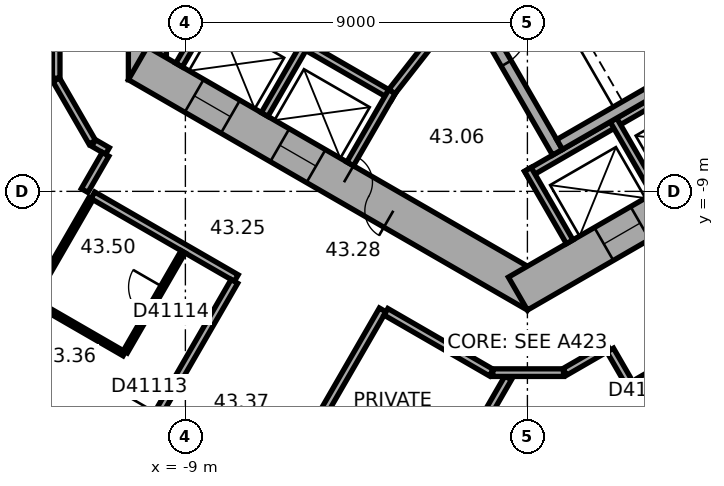
"""IFC4 building model, lengths in metres.
Left out: names, types, materials, properties, quantities, classifications, styles, units other than length and angle.
Written with IfcOpenShell. Run it as: python <this file> out.ifc"""

import sys

from ifc_helpers import new_model, si_unit, direction, frame, frame_2d, origin, place, context, subcontext, project, spatial, rectangle, extrude, element, fill, save


model = new_model("IFC4")
c1 = context("Model", 3, precision=1e-05, world=origin(), true_north=direction((0.0, 1.0)))
c2 = subcontext(c1, "Body", "Model", "MODEL_VIEW")
j1 = project(units=[si_unit("LENGTHUNIT", "METRE"), si_unit("PLANEANGLEUNIT", "RADIAN")], contexts=[c1])
p1 = place(None, origin())
s1 = spatial("IfcSite", under=j1, at=p1, CompositionType="ELEMENT")
p2 = place(p1, origin())
s2 = spatial("IfcBuilding", under=s1, at=p2, CompositionType="ELEMENT")
p3 = place(p2, frame((0.0, 0.0, 176.2)))
s3 = spatial("IfcBuildingStorey", under=s2, at=p3, CompositionType="ELEMENT", Elevation=176.2)
p4 = place(p3, frame((-10.0, 6.062, 0.0), z_axis=(0.0, 0.0, 1.0), x_axis=(0.0, -1.0, 0.0)))
e1 = element("IfcWall", 1, at=p4, inside=s3, PredefinedType="SHEAR", context=c2, shape_type="SweptSolid", body=[
    extrude(rectangle(XDim=12.125, YDim=1.0, at=frame_2d((6.062, 0.0))), origin(), (0.0, 0.0, 1.0), 3.7),
])
p5 = place(p4, frame((5.212, 0.0, 0.0)))
e2 = element("IfcOpeningElement", 2, at=p5, cuts=e1, PredefinedType="OPENING", context=c2, shape_type="SweptSolid", body=[
    extrude(rectangle(XDim=1.1, YDim=2.1, at=frame_2d((0.55, 1.05))), frame((0.0, 0.51, 0.0), z_axis=(0.0, -1.0, 0.0), x_axis=(1.0, 0.0, 0.0)), (0.0, 0.0, 1.0), 1.02),
])
p6 = place(p4, frame((7.812, 0.0, 0.0)))
e3 = element("IfcOpeningElement", 3, at=p6, cuts=e1, PredefinedType="OPENING", context=c2, shape_type="SweptSolid", body=[
    extrude(rectangle(XDim=1.1, YDim=2.1, at=frame_2d((0.55, 1.05))), frame((0.0, 0.51, 0.0), z_axis=(0.0, -1.0, 0.0), x_axis=(1.0, 0.0, 0.0)), (0.0, 0.0, 1.0), 1.02),
])
p7 = place(p3, frame((-10.25, -5.629, 0.0), z_axis=(0.0, 0.0, 1.0), x_axis=(0.866022616891, -0.50000482701, 0.0)))
e4 = element("IfcWall", 4, at=p7, inside=s3, PredefinedType="SHEAR", context=c2, shape_type="SweptSolid", body=[
    extrude(rectangle(XDim=12.125, YDim=1.0, at=frame_2d((6.062, 0.0))), origin(), (0.0, 0.0, 1.0), 3.7),
])
p8 = place(p7, frame((6.262, 0.0, 0.0)))
e5 = element("IfcOpeningElement", 5, at=p8, cuts=e4, PredefinedType="OPENING", context=c2, shape_type="SweptSolid", body=[
    extrude(rectangle(XDim=1.5, YDim=2.1, at=frame_2d((0.75, 1.05))), frame((0.0, 0.51, 0.0), z_axis=(0.0, -1.0, 0.0), x_axis=(1.0, 0.0, 0.0)), (0.0, 0.0, 1.0), 1.02),
])
p9 = place(p7, frame((1.712, 0.0, 0.0)))
e6 = element("IfcOpeningElement", 6, at=p9, cuts=e4, PredefinedType="OPENING", context=c2, shape_type="SweptSolid", body=[
    extrude(rectangle(XDim=1.1, YDim=2.1, at=frame_2d((0.55, 1.05))), frame((0.0, 0.51, 0.0), z_axis=(0.0, -1.0, 0.0), x_axis=(1.0, 0.0, 0.0)), (0.0, 0.0, 1.0), 1.02),
])
p10 = place(p7, frame((4.312, 0.0, 0.0)))
e7 = element("IfcOpeningElement", 7, at=p10, cuts=e4, PredefinedType="OPENING", context=c2, shape_type="SweptSolid", body=[
    extrude(rectangle(XDim=1.1, YDim=2.1, at=frame_2d((0.55, 1.05))), frame((0.0, 0.51, 0.0), z_axis=(0.0, -1.0, 0.0), x_axis=(1.0, 0.0, 0.0)), (0.0, 0.0, 1.0), 1.02),
])
p11 = place(p3, frame((-0.25, -11.691, 0.0), z_axis=(0.0, 0.0, 1.0), x_axis=(0.866022616891, 0.50000482701, 0.0)))
e8 = element("IfcWall", 8, at=p11, inside=s3, PredefinedType="SHEAR", context=c2, shape_type="SweptSolid", body=[
    extrude(rectangle(XDim=12.125, YDim=1.0, at=frame_2d((6.062, 0.0))), origin(), (0.0, 0.0, 1.0), 3.7),
])
p12 = place(p11, frame((2.612, 0.0, 0.0)))
e9 = element("IfcOpeningElement", 9, at=p12, cuts=e8, PredefinedType="OPENING", context=c2, shape_type="SweptSolid", body=[
    extrude(rectangle(XDim=1.1, YDim=2.1, at=frame_2d((0.55, 1.05))), frame((0.0, 0.51, 0.0), z_axis=(0.0, -1.0, 0.0), x_axis=(1.0, 0.0, 0.0)), (0.0, 0.0, 1.0), 1.02),
])
p13 = place(p11, frame((5.212, 0.0, 0.0)))
e10 = element("IfcOpeningElement", 10, at=p13, cuts=e8, PredefinedType="OPENING", context=c2, shape_type="SweptSolid", body=[
    extrude(rectangle(XDim=1.1, YDim=2.1, at=frame_2d((0.55, 1.05))), frame((0.0, 0.51, 0.0), z_axis=(0.0, -1.0, 0.0), x_axis=(1.0, 0.0, 0.0)), (0.0, 0.0, 1.0), 1.02),
])
p14 = place(p11, frame((7.812, 0.0, 0.0)))
e11 = element("IfcOpeningElement", 11, at=p14, cuts=e8, PredefinedType="OPENING", context=c2, shape_type="SweptSolid", body=[
    extrude(rectangle(XDim=1.1, YDim=2.1, at=frame_2d((0.55, 1.05))), frame((0.0, 0.51, 0.0), z_axis=(0.0, -1.0, 0.0), x_axis=(1.0, 0.0, 0.0)), (0.0, 0.0, 1.0), 1.02),
])
p15 = place(p3, frame((-18.789, -14.267, 0.0), z_axis=(0.0, 0.0, 1.0), x_axis=(0.866023315909, -0.500003616288, 0.0)))
e12 = element("IfcWall", 12, at=p15, inside=s3, PredefinedType="STANDARD", context=c2, shape_type="SweptSolid", body=[
    extrude(rectangle(XDim=20.044, YDim=0.2, at=frame_2d((10.022, 0.0))), origin(), (0.0, 0.0, 1.0), 3.7),
])
p16 = place(p15, frame((1.314, 0.0, 0.9)))
e13 = element("IfcOpeningElement", 13, at=p16, cuts=e12, PredefinedType="OPENING", context=c2, shape_type="SweptSolid", body=[
    extrude(rectangle(XDim=2.4, YDim=2.0, at=frame_2d((1.2, 1.0))), frame((0.0, 0.11, 0.0), z_axis=(0.0, -1.0, 0.0), x_axis=(1.0, 0.0, 0.0)), (0.0, 0.0, 1.0), 0.22),
])
p17 = place(p15, frame((5.069, 0.0, 0.9)))
e14 = element("IfcOpeningElement", 14, at=p17, cuts=e12, PredefinedType="OPENING", context=c2, shape_type="SweptSolid", body=[
    extrude(rectangle(XDim=2.4, YDim=2.0, at=frame_2d((1.2, 1.0))), frame((0.0, 0.11, 0.0), z_axis=(0.0, -1.0, 0.0), x_axis=(1.0, 0.0, 0.0)), (0.0, 0.0, 1.0), 0.22),
])
p18 = place(p15, frame((8.823, 0.0, 0.9)))
e15 = element("IfcOpeningElement", 15, at=p18, cuts=e12, PredefinedType="OPENING", context=c2, shape_type="SweptSolid", body=[
    extrude(rectangle(XDim=2.4, YDim=2.0, at=frame_2d((1.2, 1.0))), frame((0.0, 0.11, 0.0), z_axis=(0.0, -1.0, 0.0), x_axis=(1.0, 0.0, 0.0)), (0.0, 0.0, 1.0), 0.22),
])
p19 = place(p15, frame((12.577, 0.0, 0.9)))
e16 = element("IfcOpeningElement", 16, at=p19, cuts=e12, PredefinedType="OPENING", context=c2, shape_type="SweptSolid", body=[
    extrude(rectangle(XDim=2.4, YDim=2.0, at=frame_2d((1.2, 1.0))), frame((0.0, 0.11, 0.0), z_axis=(0.0, -1.0, 0.0), x_axis=(1.0, 0.0, 0.0)), (0.0, 0.0, 1.0), 0.22),
])
p20 = place(p15, frame((16.331, 0.0, 0.9)))
e17 = element("IfcOpeningElement", 17, at=p20, cuts=e12, PredefinedType="OPENING", context=c2, shape_type="SweptSolid", body=[
    extrude(rectangle(XDim=2.4, YDim=2.0, at=frame_2d((1.2, 1.0))), frame((0.0, 0.11, 0.0), z_axis=(0.0, -1.0, 0.0), x_axis=(1.0, 0.0, 0.0)), (0.0, 0.0, 1.0), 0.22),
])
p21 = place(p3, frame((2.911, -24.156, 0.0), z_axis=(0.0, 0.0, 1.0), x_axis=(0.833882163564, 0.551942512668, 0.0)))
e18 = element("IfcWall", 18, at=p21, inside=s3, PredefinedType="STANDARD", context=c2, shape_type="SweptSolid", body=[
    extrude(rectangle(XDim=20.044, YDim=0.2, at=frame_2d((10.022, 0.0))), origin(), (0.0, 0.0, 1.0), 3.7),
])
p22 = place(p21, frame((1.313, 0.0, 0.9)))
e19 = element("IfcOpeningElement", 19, at=p22, cuts=e18, PredefinedType="OPENING", context=c2, shape_type="SweptSolid", body=[
    extrude(rectangle(XDim=2.4, YDim=2.0, at=frame_2d((1.2, 1.0))), frame((0.0, 0.11, 0.0), z_axis=(0.0, -1.0, 0.0), x_axis=(1.0, 0.0, 0.0)), (0.0, 0.0, 1.0), 0.22),
])
p23 = place(p21, frame((5.067, 0.0, 0.9)))
e20 = element("IfcOpeningElement", 20, at=p23, cuts=e18, PredefinedType="OPENING", context=c2, shape_type="SweptSolid", body=[
    extrude(rectangle(XDim=2.4, YDim=2.0, at=frame_2d((1.2, 1.0))), frame((0.0, 0.11, 0.0), z_axis=(0.0, -1.0, 0.0), x_axis=(1.0, 0.0, 0.0)), (0.0, 0.0, 1.0), 0.22),
])
p24 = place(p21, frame((8.821, 0.0, 0.9)))
e21 = element("IfcOpeningElement", 21, at=p24, cuts=e18, PredefinedType="OPENING", context=c2, shape_type="SweptSolid", body=[
    extrude(rectangle(XDim=2.4, YDim=2.0, at=frame_2d((1.2, 1.0))), frame((0.0, 0.11, 0.0), z_axis=(0.0, -1.0, 0.0), x_axis=(1.0, 0.0, 0.0)), (0.0, 0.0, 1.0), 0.22),
])
p25 = place(p21, frame((12.575, 0.0, 0.9)))
e22 = element("IfcOpeningElement", 22, at=p25, cuts=e18, PredefinedType="OPENING", context=c2, shape_type="SweptSolid", body=[
    extrude(rectangle(XDim=2.4, YDim=2.0, at=frame_2d((1.2, 1.0))), frame((0.0, 0.11, 0.0), z_axis=(0.0, -1.0, 0.0), x_axis=(1.0, 0.0, 0.0)), (0.0, 0.0, 1.0), 0.22),
])
p26 = place(p21, frame((16.329, 0.0, 0.9)))
e23 = element("IfcOpeningElement", 23, at=p26, cuts=e18, PredefinedType="OPENING", context=c2, shape_type="SweptSolid", body=[
    extrude(rectangle(XDim=2.4, YDim=2.0, at=frame_2d((1.2, 1.0))), frame((0.0, 0.11, 0.0), z_axis=(0.0, -1.0, 0.0), x_axis=(1.0, 0.0, 0.0)), (0.0, 0.0, 1.0), 0.22),
])
p27 = place(p3, frame((-8.203, -3.809, 0.0), z_axis=(0.0, 0.0, 1.0), x_axis=(0.866028230842, -0.499995103361, 0.0)))
e24 = element("IfcWall", 24, at=p27, inside=s3, PredefinedType="PARTITIONING", context=c2, shape_type="SweptSolid", body=[
    extrude(rectangle(XDim=5.4, YDim=0.2, at=frame_2d((2.7, 0.0))), origin(), (0.0, 0.0, 1.0), 3.42),
])
for number, where, z_axis, x_axis in (
    (25, (-8.067, -3.772, 0.0), (0.0, 0.0, 1.0), (-0.5, -0.866, 0.0)),
    (26, (-5.815, -5.072, 0.0), (0.0, 0.0, 1.0), (-0.5, -0.866, 0.0)),
):
    element("IfcWall", number, at=place(p3, frame(where, z_axis=z_axis, x_axis=x_axis)), inside=s3, PredefinedType="PARTITIONING", context=c2, shape_type="SweptSolid", body=[
        extrude(rectangle(XDim=2.2, YDim=0.2, at=frame_2d((1.1, 0.0))), origin(), (0.0, 0.0, 1.0), 3.42),
    ])
p28 = place(p3, frame((-3.563, -6.372, 0.0), z_axis=(0.0, 0.0, 1.0), x_axis=(-0.499994660107, -0.866028486751, 0.0)))
e27 = element("IfcWall", 27, at=p28, inside=s3, PredefinedType="PARTITIONING", context=c2, shape_type="SweptSolid", body=[
    extrude(rectangle(XDim=2.2, YDim=0.2, at=frame_2d((1.1, 0.0))), origin(), (0.0, 0.0, 1.0), 3.42),
])
p29 = place(p3, frame((-0.024, -8.559, 0.0), z_axis=(0.0, 0.0, 1.0), x_axis=(0.866026010844, 0.49999894854, 0.0)))
e28 = element("IfcWall", 28, at=p29, inside=s3, PredefinedType="PARTITIONING", context=c2, shape_type="SweptSolid", body=[
    extrude(rectangle(XDim=8.0, YDim=0.2, at=frame_2d((4.0, 0.0))), origin(), (0.0, 0.0, 1.0), 3.42),
])
for number, where, z_axis, x_axis in (
    (29, (0.013, -8.422, 0.0), (0.0, 0.0, 1.0), (0.5, -0.866, 0.0)),
    (30, (2.264, -7.122, 0.0), (0.0, 0.0, 1.0), (0.5, -0.866, 0.0)),
):
    element("IfcWall", number, at=place(p3, frame(where, z_axis=z_axis, x_axis=x_axis)), inside=s3, PredefinedType="PARTITIONING", context=c2, shape_type="SweptSolid", body=[
        extrude(rectangle(XDim=2.2, YDim=0.2, at=frame_2d((1.1, 0.0))), origin(), (0.0, 0.0, 1.0), 3.42),
    ])
p30 = place(p3, frame((-1.558, -3.902, 0.0), z_axis=(0.0, 0.0, 1.0), x_axis=(0.499977259774, -0.866038532462, 0.0)))
e31 = element("IfcWall", 31, at=p30, inside=s3, PredefinedType="SHEAR", context=c2, shape_type="SweptSolid", body=[
    extrude(rectangle(XDim=4.7, YDim=0.3, at=frame_2d((2.35, 0.0))), origin(), (0.0, 0.0, 1.0), 3.42),
])
p31 = place(p30, frame((0.8, 0.0, 0.0)))
e32 = element("IfcOpeningElement", 32, at=p31, cuts=e31, PredefinedType="OPENING", context=c2, shape_type="SweptSolid", body=[
    extrude(rectangle(XDim=1.2, YDim=2.1, at=frame_2d((0.6, 1.05))), frame((0.0, 0.16, 0.0), z_axis=(0.0, -1.0, 0.0), x_axis=(1.0, 0.0, 0.0)), (0.0, 0.0, 1.0), 0.32),
])
p32 = place(p3, frame((0.847, -7.767, 0.0), z_axis=(0.0, 0.0, 1.0), x_axis=(0.866027801685, 0.499995846692, 0.0)))
e33 = element("IfcWall", 33, at=p32, inside=s3, PredefinedType="SHEAR", context=c2, shape_type="SweptSolid", body=[
    extrude(rectangle(XDim=7.06, YDim=0.3, at=frame_2d((3.53, 0.0))), origin(), (0.0, 0.0, 1.0), 3.42),
])
p33 = place(p3, frame((-1.712, -4.008, 0.0), z_axis=(0.0, 0.0, 1.0), x_axis=(-0.616549420702, -0.787316208287, 0.0)))
e34 = element("IfcWall", 34, at=p33, inside=s3, PredefinedType="PARTITIONING", context=c2, shape_type="SweptSolid", body=[
    extrude(rectangle(XDim=3.002, YDim=0.2, at=frame_2d((1.501, 0.0))), origin(), (0.0, 0.0, 1.0), 3.42),
])
p34 = place(p3, frame((-20.421, -6.005, 0.0), z_axis=(0.0, 0.0, 1.0), x_axis=(0.998134865741, 0.061047438866, 0.0)))
e35 = element("IfcWall", 35, at=p34, inside=s3, PredefinedType="PARTITIONING", context=c2, shape_type="SweptSolid", body=[
    extrude(rectangle(XDim=7.927, YDim=0.2, at=frame_2d((3.963, 0.0))), origin(), (0.0, 0.0, 1.0), 2.87),
])
p35 = place(p3, frame((-13.035, -11.875, 0.0), z_axis=(0.0, 0.0, 1.0), x_axis=(0.500026960575, 0.86600983753, 0.0)))
e36 = element("IfcWall", 36, at=p35, inside=s3, PredefinedType="PARTITIONING", context=c2, shape_type="SweptSolid", body=[
    extrude(rectangle(XDim=3.1, YDim=0.12, at=frame_2d((1.55, 0.0))), origin(), (0.0, 0.0, 1.0), 3.42),
])
p36 = place(p3, frame((-12.4, -6.062, 0.0), z_axis=(0.0, 0.0, 1.0), x_axis=(0.500022797313, -0.86601224135, 0.0)))
e37 = element("IfcWall", 37, at=p36, inside=s3, PredefinedType="PARTITIONING", context=c2, shape_type="SweptSolid", body=[
    extrude(rectangle(XDim=1.9, YDim=0.2, at=frame_2d((0.95, 0.0))), origin(), (0.0, 0.0, 1.0), 3.42),
])
p37 = place(p3, frame((-12.4, -4.201, 0.0), z_axis=(0.0, 0.0, 1.0), x_axis=(0.0, -1.0, 0.0)))
e38 = element("IfcWall", 38, at=p37, inside=s3, PredefinedType="PARTITIONING", context=c2, shape_type="SweptSolid", body=[
    extrude(rectangle(XDim=1.821, YDim=0.2, at=frame_2d((0.911, 0.0))), origin(), (0.0, 0.0, 1.0), 3.42),
])
p38 = place(p3, frame((-11.435, -9.103, 0.0), z_axis=(0.0, 0.0, 1.0), x_axis=(0.866007399799, -0.500031182522, 0.0)))
e39 = element("IfcWall", 39, at=p38, inside=s3, PredefinedType="PARTITIONING", context=c2, shape_type="SweptSolid", body=[
    extrude(rectangle(XDim=4.358, YDim=0.2, at=frame_2d((2.179, 0.0))), origin(), (0.0, 0.0, 1.0), 3.42),
])
p39 = place(p3, frame((-11.415, -7.728, 0.0), z_axis=(0.0, 0.0, 1.0), x_axis=(0.865915281873, -0.500190688257, 0.0)))
e40 = element("IfcWall", 40, at=p39, inside=s3, PredefinedType="PARTITIONING", context=c2, shape_type="SweptSolid", body=[
    extrude(rectangle(XDim=0.421, YDim=0.2, at=frame_2d((0.21, 0.0))), origin(), (0.0, 0.0, 1.0), 3.42),
])
p40 = place(p3, frame((-11.235, -17.474, 0.0), z_axis=(0.0, 0.0, 1.0), x_axis=(0.500009260695, 0.866020057054, 0.0)))
e41 = element("IfcWall", 41, at=p40, inside=s3, PredefinedType="PARTITIONING", context=c2, shape_type="SweptSolid", body=[
    extrude(rectangle(XDim=7.049, YDim=0.2, at=frame_2d((3.524, 0.0))), origin(), (0.0, 0.0, 1.0), 2.87),
])
p41 = place(p40, frame((3.024, 0.0, 0.0)))
e42 = element("IfcOpeningElement", 42, at=p41, cuts=e41, PredefinedType="OPENING", context=c2, shape_type="SweptSolid", body=[
    extrude(rectangle(XDim=1.0, YDim=2.1, at=frame_2d((0.5, 1.05))), frame((0.0, 0.11, 0.0), z_axis=(0.0, -1.0, 0.0), x_axis=(1.0, 0.0, 0.0)), (0.0, 0.0, 1.0), 0.22),
])
p42 = place(p3, frame((-11.101, -8.025, 0.0), z_axis=(0.0, 0.0, 1.0), x_axis=(-0.500074377092, -0.865982457891, 0.0)))
e43 = element("IfcWall", 43, at=p42, inside=s3, PredefinedType="PARTITIONING", context=c2, shape_type="SweptSolid", body=[
    extrude(rectangle(XDim=1.101, YDim=0.2, at=frame_2d((0.55, 0.0))), origin(), (0.0, 0.0, 1.0), 3.42),
])
p43 = place(p3, frame((-10.61, -13.275, 0.0), z_axis=(0.0, 0.0, 1.0), x_axis=(-0.866019409031, 0.500010383074, 0.0)))
e44 = element("IfcWall", 44, at=p43, inside=s3, PredefinedType="PARTITIONING", context=c2, shape_type="SweptSolid", body=[
    extrude(rectangle(XDim=2.74, YDim=0.12, at=frame_2d((1.37, 0.0))), origin(), (0.0, 0.0, 1.0), 3.42),
])
p44 = place(p3, frame((-9.06, -10.59, 0.0), z_axis=(0.0, 0.0, 1.0), x_axis=(-0.49993101378, -0.866065229334, 0.0)))
e45 = element("IfcWall", 45, at=p44, inside=s3, PredefinedType="PARTITIONING", context=c2, shape_type="SweptSolid", body=[
    extrude(rectangle(XDim=3.04, YDim=0.12, at=frame_2d((1.52, 0.0))), origin(), (0.0, 0.0, 1.0), 3.42),
])
p45 = place(p44, frame((1.07, 0.0, 0.0)))
e46 = element("IfcOpeningElement", 46, at=p45, cuts=e45, PredefinedType="OPENING", context=c2, shape_type="SweptSolid", body=[
    extrude(rectangle(XDim=0.9, YDim=2.1, at=frame_2d((0.45, 1.05))), frame((0.0, 0.07, 0.0), z_axis=(0.0, -1.0, 0.0), x_axis=(1.0, 0.0, 0.0)), (0.0, 0.0, 1.0), 0.14),
])
p46 = place(p3, frame((-7.984, -19.351, 0.0), z_axis=(0.0, 0.0, 1.0), x_axis=(0.500010139422, 0.866019549707, 0.0)))
e47 = element("IfcWall", 47, at=p46, inside=s3, PredefinedType="PARTITIONING", context=c2, shape_type="SweptSolid", body=[
    extrude(rectangle(XDim=8.35, YDim=0.2, at=frame_2d((4.175, 0.0))), origin(), (0.0, 0.0, 1.0), 3.42),
])
p47 = place(p46, frame((3.675, 0.0, 0.0)))
e48 = element("IfcOpeningElement", 48, at=p47, cuts=e47, PredefinedType="OPENING", context=c2, shape_type="SweptSolid", body=[
    extrude(rectangle(XDim=1.0, YDim=2.1, at=frame_2d((0.5, 1.05))), frame((0.0, 0.11, 0.0), z_axis=(0.0, -1.0, 0.0), x_axis=(1.0, 0.0, 0.0)), (0.0, 0.0, 1.0), 0.22),
])
p48 = place(p3, frame((-4.732, -21.228, 0.0), z_axis=(0.0, 0.0, 1.0), x_axis=(0.500000843414, 0.866024916838, 0.0)))
e49 = element("IfcWall", 49, at=p48, inside=s3, PredefinedType="PARTITIONING", context=c2, shape_type="SweptSolid", body=[
    extrude(rectangle(XDim=8.452, YDim=0.2, at=frame_2d((4.226, 0.0))), origin(), (0.0, 0.0, 1.0), 3.42),
])
p49 = place(p3, frame((-3.722, -12.169, 0.0), z_axis=(0.0, 0.0, 1.0), x_axis=(0.866033163891, -0.499986558861, 0.0)))
e50 = element("IfcWall", 50, at=p49, inside=s3, PredefinedType="PARTITIONING", context=c2, shape_type="SweptSolid", body=[
    extrude(rectangle(XDim=3.201, YDim=0.2, at=frame_2d((1.6, 0.0))), origin(), (0.0, 0.0, 1.0), 3.42),
])
p50 = place(p3, frame((-0.91, -13.77, 0.0), z_axis=(0.0, 0.0, 1.0), x_axis=(1.0, 0.0, 0.0)))
e51 = element("IfcWall", 51, at=p50, inside=s3, PredefinedType="PARTITIONING", context=c2, shape_type="SweptSolid", body=[
    extrude(rectangle(XDim=1.86, YDim=0.2, at=frame_2d((0.93, 0.0))), origin(), (0.0, 0.0, 1.0), 3.42),
])
p51 = place(p3, frame((0.985, -13.75, 0.0), z_axis=(0.0, 0.0, 1.0), x_axis=(0.866028661061, 0.499994358189, 0.0)))
e52 = element("IfcWall", 52, at=p51, inside=s3, PredefinedType="PARTITIONING", context=c2, shape_type="SweptSolid", body=[
    extrude(rectangle(XDim=1.321, YDim=0.2, at=frame_2d((0.661, 0.0))), origin(), (0.0, 0.0, 1.0), 3.42),
])
p52 = place(p3, frame((2.179, -13.176, 0.0), z_axis=(0.0, 0.0, 1.0), x_axis=(0.499978356969, -0.866037899034, 0.0)))
e53 = element("IfcWall", 53, at=p52, inside=s3, PredefinedType="PARTITIONING", context=c2, shape_type="SweptSolid", body=[
    extrude(rectangle(XDim=1.101, YDim=0.2, at=frame_2d((0.551, 0.0))), origin(), (0.0, 0.0, 1.0), 3.42),
])
p53 = place(p3, frame((2.946, -14.004, 0.0), z_axis=(0.0, 0.0, 1.0), x_axis=(0.866041268327, 0.499972520799, 0.0)))
e54 = element("IfcWall", 54, at=p53, inside=s3, PredefinedType="PARTITIONING", context=c2, shape_type="SweptSolid", body=[
    extrude(rectangle(XDim=2.0, YDim=0.2, at=frame_2d((1.0, 0.0))), origin(), (0.0, 0.0, 1.0), 3.42),
])
p54 = place(p3, frame((4.146, -16.083, 0.0), z_axis=(0.0, 0.0, 1.0), x_axis=(-0.499952165731, 0.866053019151, 0.0)))
e55 = element("IfcWall", 55, at=p54, inside=s3, PredefinedType="PARTITIONING", context=c2, shape_type="SweptSolid", body=[
    extrude(rectangle(XDim=2.3, YDim=0.12, at=frame_2d((1.15, 0.0))), origin(), (0.0, 0.0, 1.0), 3.42),
])
p55 = place(p54, frame((0.7, 0.0, 0.0)))
e56 = element("IfcOpeningElement", 56, at=p55, cuts=e55, PredefinedType="OPENING", context=c2, shape_type="SweptSolid", body=[
    extrude(rectangle(XDim=0.9, YDim=2.1, at=frame_2d((0.45, 1.05))), frame((0.0, 0.07, 0.0), z_axis=(0.0, -1.0, 0.0), x_axis=(1.0, 0.0, 0.0)), (0.0, 0.0, 1.0), 0.14),
])
p56 = place(p8, origin())
e57 = element("IfcDoor", 57, at=p56, inside=s3, OperationType="DOUBLE_DOOR_SINGLE_SWING", PredefinedType="DOOR", context=c2, shape_type="SweptSolid", body=[
    extrude(rectangle(XDim=1.5, YDim=2.1, at=frame_2d((0.75, 1.05))), frame((0.0, 0.025, 0.0), z_axis=(0.0, -1.0, 0.0), x_axis=(1.0, 0.0, 0.0)), (0.0, 0.0, 1.0), 0.05),
])
fill(e5, e57)
p57 = place(p31, origin())
e58 = element("IfcDoor", 58, at=p57, inside=s3, OperationType="SINGLE_SWING_RIGHT", PredefinedType="DOOR", context=c2, shape_type="SweptSolid", body=[
    extrude(rectangle(XDim=1.2, YDim=2.1, at=frame_2d((0.6, 1.05))), frame((0.0, 0.025, 0.0), z_axis=(0.0, -1.0, 0.0), x_axis=(1.0, 0.0, 0.0)), (0.0, 0.0, 1.0), 0.05),
])
fill(e32, e58)
p58 = place(p9, origin())
e59 = element("IfcDoor", 59, at=p58, inside=s3, OperationType="DOUBLE_DOOR_SLIDING", PredefinedType="DOOR", context=c2, shape_type="SweptSolid", body=[
    extrude(rectangle(XDim=1.1, YDim=2.1, at=frame_2d((0.55, 1.05))), frame((0.0, 0.025, 0.0), z_axis=(0.0, -1.0, 0.0), x_axis=(1.0, 0.0, 0.0)), (0.0, 0.0, 1.0), 0.05),
])
fill(e6, e59)
p59 = place(p10, origin())
e60 = element("IfcDoor", 60, at=p59, inside=s3, OperationType="DOUBLE_DOOR_SLIDING", PredefinedType="DOOR", context=c2, shape_type="SweptSolid", body=[
    extrude(rectangle(XDim=1.1, YDim=2.1, at=frame_2d((0.55, 1.05))), frame((0.0, 0.025, 0.0), z_axis=(0.0, -1.0, 0.0), x_axis=(1.0, 0.0, 0.0)), (0.0, 0.0, 1.0), 0.05),
])
fill(e7, e60)
p60 = place(p12, origin())
e61 = element("IfcDoor", 61, at=p60, inside=s3, OperationType="DOUBLE_DOOR_SLIDING", PredefinedType="DOOR", context=c2, shape_type="SweptSolid", body=[
    extrude(rectangle(XDim=1.1, YDim=2.1, at=frame_2d((0.55, 1.05))), frame((0.0, 0.025, 0.0), z_axis=(0.0, -1.0, 0.0), x_axis=(1.0, 0.0, 0.0)), (0.0, 0.0, 1.0), 0.05),
])
fill(e9, e61)
p61 = place(p41, origin())
e62 = element("IfcDoor", 62, at=p61, inside=s3, OperationType="SINGLE_SWING_LEFT", PredefinedType="DOOR", context=c2, shape_type="SweptSolid", body=[
    extrude(rectangle(XDim=1.0, YDim=2.1, at=frame_2d((0.5, 1.05))), frame((0.0, 0.025, 0.0), z_axis=(0.0, -1.0, 0.0), x_axis=(1.0, 0.0, 0.0)), (0.0, 0.0, 1.0), 0.05),
])
fill(e42, e62)
p62 = place(p45, origin())
e63 = element("IfcDoor", 63, at=p62, inside=s3, OperationType="SINGLE_SWING_LEFT", PredefinedType="DOOR", context=c2, shape_type="SweptSolid", body=[
    extrude(rectangle(XDim=0.9, YDim=2.1, at=frame_2d((0.45, 1.05))), frame((0.0, 0.025, 0.0), z_axis=(0.0, -1.0, 0.0), x_axis=(1.0, 0.0, 0.0)), (0.0, 0.0, 1.0), 0.05),
])
fill(e46, e63)
save(model, sys.argv[1])
